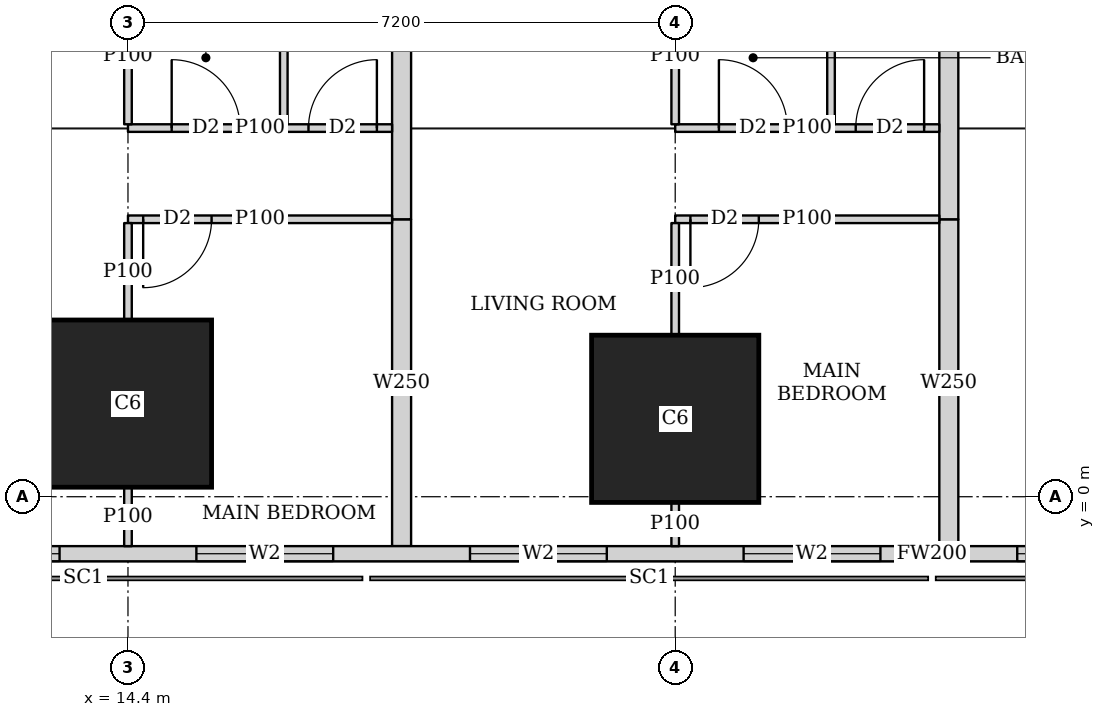
"""IFC4 building model, lengths in metres.
Left out: names, types, materials, properties, quantities, classifications, styles, units other than length and angle.
Written with IfcOpenShell. Run it as: python <this file> out.ifc"""

import sys

from ifc_helpers import new_model, si_unit, direction, frame, frame_2d, origin, origin_2d, place, context, subcontext, project, spatial, rectangle, extrude, element, fill, save


model = new_model("IFC4")
c1 = context("Model", 3, precision=1e-05, world=origin(), true_north=direction((0.0, 1.0)))
c2 = subcontext(c1, "Body", "Model", "MODEL_VIEW")
j1 = project(units=[si_unit("LENGTHUNIT", "METRE"), si_unit("PLANEANGLEUNIT", "RADIAN")], contexts=[c1])
p1 = place(None, origin())
s1 = spatial("IfcSite", under=j1, at=p1, CompositionType="ELEMENT")
p2 = place(p1, origin())
s2 = spatial("IfcBuilding", under=s1, at=p2, CompositionType="ELEMENT")
p3 = place(p2, frame((0.0, 0.0, 89.15)))
s3 = spatial("IfcBuildingStorey", under=s2, at=p3, CompositionType="ELEMENT", Elevation=89.15)
for number, where, z_axis, x_axis in (
    (1, (14.4, 1.225, 0.0), (0.0, 0.0, 1.0), (1.0, 0.0, 0.0)),
    (2, (21.6, 1.025, 0.0), (0.0, 0.0, 1.0), (1.0, 0.0, 0.0)),
):
    element("IfcColumn", number, at=place(p3, frame(where, z_axis=z_axis, x_axis=x_axis)), inside=s3, PredefinedType="COLUMN", context=c2, shape_type="SweptSolid", body=[
        extrude(rectangle(XDim=2.2, YDim=2.2, at=origin_2d()), origin(), (0.0, 0.0, 1.0), 3.75),
    ])
p4 = place(p3, frame((2.163, -0.75, 0.0), z_axis=(0.0, 0.0, 1.0), x_axis=(1.0, 0.0, 0.0)))
e3 = element("IfcWall", 3, at=p4, inside=s3, PredefinedType="SOLIDWALL", context=c2, shape_type="SweptSolid", body=[
    extrude(rectangle(XDim=45.628, YDim=0.2, at=frame_2d((22.814, 0.0))), origin(), (0.0, 0.0, 1.0), 3.5),
])
p5 = place(p4, frame((9.537, 0.0, 0.9)))
e4 = element("IfcOpeningElement", 4, at=p5, cuts=e3, PredefinedType="OPENING", context=c2, shape_type="SweptSolid", body=[
    extrude(rectangle(XDim=1.8, YDim=1.5, at=frame_2d((0.9, 0.75))), frame((0.0, 0.11, 0.0), z_axis=(0.0, -1.0, 0.0), x_axis=(1.0, 0.0, 0.0)), (0.0, 0.0, 1.0), 0.22),
])
p6 = place(p4, frame((13.137, 0.0, 0.9)))
e5 = element("IfcOpeningElement", 5, at=p6, cuts=e3, PredefinedType="OPENING", context=c2, shape_type="SweptSolid", body=[
    extrude(rectangle(XDim=1.8, YDim=1.5, at=frame_2d((0.9, 0.75))), frame((0.0, 0.11, 0.0), z_axis=(0.0, -1.0, 0.0), x_axis=(1.0, 0.0, 0.0)), (0.0, 0.0, 1.0), 0.22),
])
p7 = place(p4, frame((16.737, 0.0, 0.9)))
e6 = element("IfcOpeningElement", 6, at=p7, cuts=e3, PredefinedType="OPENING", context=c2, shape_type="SweptSolid", body=[
    extrude(rectangle(XDim=1.8, YDim=1.5, at=frame_2d((0.9, 0.75))), frame((0.0, 0.11, 0.0), z_axis=(0.0, -1.0, 0.0), x_axis=(1.0, 0.0, 0.0)), (0.0, 0.0, 1.0), 0.22),
])
p8 = place(p4, frame((20.337, 0.0, 0.9)))
e7 = element("IfcOpeningElement", 7, at=p8, cuts=e3, PredefinedType="OPENING", context=c2, shape_type="SweptSolid", body=[
    extrude(rectangle(XDim=1.8, YDim=1.5, at=frame_2d((0.9, 0.75))), frame((0.0, 0.11, 0.0), z_axis=(0.0, -1.0, 0.0), x_axis=(1.0, 0.0, 0.0)), (0.0, 0.0, 1.0), 0.22),
])
p9 = place(p4, frame((23.937, 0.0, 0.9)))
e8 = element("IfcOpeningElement", 8, at=p9, cuts=e3, PredefinedType="OPENING", context=c2, shape_type="SweptSolid", body=[
    extrude(rectangle(XDim=1.8, YDim=1.5, at=frame_2d((0.9, 0.75))), frame((0.0, 0.11, 0.0), z_axis=(0.0, -1.0, 0.0), x_axis=(1.0, 0.0, 0.0)), (0.0, 0.0, 1.0), 0.22),
])
p10 = place(p4, frame((27.537, 0.0, 0.9)))
e9 = element("IfcOpeningElement", 9, at=p10, cuts=e3, PredefinedType="OPENING", context=c2, shape_type="SweptSolid", body=[
    extrude(rectangle(XDim=1.8, YDim=1.5, at=frame_2d((0.9, 0.75))), frame((0.0, 0.11, 0.0), z_axis=(0.0, -1.0, 0.0), x_axis=(1.0, 0.0, 0.0)), (0.0, 0.0, 1.0), 0.22),
])
p11 = place(p4, frame((31.137, 0.0, 0.9)))
e10 = element("IfcOpeningElement", 10, at=p11, cuts=e3, PredefinedType="OPENING", context=c2, shape_type="SweptSolid", body=[
    extrude(rectangle(XDim=1.8, YDim=1.5, at=frame_2d((0.9, 0.75))), frame((0.0, 0.11, 0.0), z_axis=(0.0, -1.0, 0.0), x_axis=(1.0, 0.0, 0.0)), (0.0, 0.0, 1.0), 0.22),
])
p12 = place(p4, frame((34.737, 0.0, 0.9)))
e11 = element("IfcOpeningElement", 11, at=p12, cuts=e3, PredefinedType="OPENING", context=c2, shape_type="SweptSolid", body=[
    extrude(rectangle(XDim=1.8, YDim=1.5, at=frame_2d((0.9, 0.75))), frame((0.0, 0.11, 0.0), z_axis=(0.0, -1.0, 0.0), x_axis=(1.0, 0.0, 0.0)), (0.0, 0.0, 1.0), 0.22),
])
p13 = place(p3, frame((17.875, 3.65, 0.0), z_axis=(0.0, 0.0, 1.0), x_axis=(-1.0, 0.0, 0.0)))
e12 = element("IfcWall", 12, at=p13, inside=s3, PredefinedType="PARTITIONING", context=c2, shape_type="SweptSolid", body=[
    extrude(rectangle(XDim=3.475, YDim=0.1, at=frame_2d((1.738, 0.0))), origin(), (0.0, 0.0, 1.0), 3.5),
])
p14 = place(p13, frame((2.375, 0.0, 0.0)))
e13 = element("IfcOpeningElement", 13, at=p14, cuts=e12, PredefinedType="OPENING", context=c2, shape_type="SweptSolid", body=[
    extrude(rectangle(XDim=0.9, YDim=2.1, at=frame_2d((0.45, 1.05))), frame((0.0, 0.06, 0.0), z_axis=(0.0, -1.0, 0.0), x_axis=(1.0, 0.0, 0.0)), (0.0, 0.0, 1.0), 0.12),
])
p15 = place(p3, frame((17.875, 4.85, 0.0), z_axis=(0.0, 0.0, 1.0), x_axis=(-1.0, 0.0, 0.0)))
e14 = element("IfcWall", 14, at=p15, inside=s3, PredefinedType="PARTITIONING", context=c2, shape_type="SweptSolid", body=[
    extrude(rectangle(XDim=3.475, YDim=0.1, at=frame_2d((1.738, 0.0))), origin(), (0.0, 0.0, 1.0), 3.5),
])
p16 = place(p15, frame((2.0, 0.0, 0.0)))
e15 = element("IfcOpeningElement", 15, at=p16, cuts=e14, PredefinedType="OPENING", context=c2, shape_type="SweptSolid", body=[
    extrude(rectangle(XDim=0.9, YDim=2.1, at=frame_2d((0.45, 1.05))), frame((0.0, 0.06, 0.0), z_axis=(0.0, -1.0, 0.0), x_axis=(1.0, 0.0, 0.0)), (0.0, 0.0, 1.0), 0.12),
])
p17 = place(p15, frame((0.2, 0.0, 0.0)))
e16 = element("IfcOpeningElement", 16, at=p17, cuts=e14, PredefinedType="OPENING", context=c2, shape_type="SweptSolid", body=[
    extrude(rectangle(XDim=0.9, YDim=2.1, at=frame_2d((0.45, 1.05))), frame((0.0, 0.06, 0.0), z_axis=(0.0, -1.0, 0.0), x_axis=(1.0, 0.0, 0.0)), (0.0, 0.0, 1.0), 0.12),
])
p18 = place(p3, frame((14.4, -0.65, 0.0), z_axis=(0.0, 0.0, 1.0), x_axis=(0.0, 1.0, 0.0)))
e17 = element("IfcWall", 17, at=p18, inside=s3, PredefinedType="PARTITIONING", context=c2, shape_type="SweptSolid", body=[
    extrude(rectangle(XDim=0.774, YDim=0.1, at=frame_2d((0.387, 0.0))), origin(), (0.0, 0.0, 1.0), 3.5),
])
p19 = place(p3, frame((14.4, 2.326, 0.0), z_axis=(0.0, 0.0, 1.0), x_axis=(0.0, 1.0, 0.0)))
e18 = element("IfcWall", 18, at=p19, inside=s3, PredefinedType="PARTITIONING", context=c2, shape_type="SweptSolid", body=[
    extrude(rectangle(XDim=1.274, YDim=0.1, at=frame_2d((0.637, 0.0))), origin(), (0.0, 0.0, 1.0), 3.5),
])
p20 = place(p3, frame((14.4, 4.9, 0.0), z_axis=(0.0, 0.0, 1.0), x_axis=(0.0, 1.0, 0.0)))
e19 = element("IfcWall", 19, at=p20, inside=s3, PredefinedType="PARTITIONING", context=c2, shape_type="SweptSolid", body=[
    extrude(rectangle(XDim=1.799, YDim=0.1, at=frame_2d((0.899, 0.0))), origin(), (0.0, 0.0, 1.0), 3.5),
])
p21 = place(p3, frame((16.45, 4.9, 0.0), z_axis=(0.0, 0.0, 1.0), x_axis=(0.0, 1.0, 0.0)))
e20 = element("IfcWall", 20, at=p21, inside=s3, PredefinedType="PARTITIONING", context=c2, shape_type="SweptSolid", body=[
    extrude(rectangle(XDim=3.525, YDim=0.1, at=frame_2d((1.763, 0.0))), origin(), (0.0, 0.0, 1.0), 3.5),
])
p22 = place(p3, frame((25.075, 3.65, 0.0), z_axis=(0.0, 0.0, 1.0), x_axis=(-1.0, 0.0, 0.0)))
e21 = element("IfcWall", 21, at=p22, inside=s3, PredefinedType="PARTITIONING", context=c2, shape_type="SweptSolid", body=[
    extrude(rectangle(XDim=3.475, YDim=0.1, at=frame_2d((1.737, 0.0))), origin(), (0.0, 0.0, 1.0), 3.5),
])
p23 = place(p22, frame((2.375, 0.0, 0.0)))
e22 = element("IfcOpeningElement", 22, at=p23, cuts=e21, PredefinedType="OPENING", context=c2, shape_type="SweptSolid", body=[
    extrude(rectangle(XDim=0.9, YDim=2.1, at=frame_2d((0.45, 1.05))), frame((0.0, 0.06, 0.0), z_axis=(0.0, -1.0, 0.0), x_axis=(1.0, 0.0, 0.0)), (0.0, 0.0, 1.0), 0.12),
])
p24 = place(p3, frame((25.075, 4.85, 0.0), z_axis=(0.0, 0.0, 1.0), x_axis=(-1.0, 0.0, 0.0)))
e23 = element("IfcWall", 23, at=p24, inside=s3, PredefinedType="PARTITIONING", context=c2, shape_type="SweptSolid", body=[
    extrude(rectangle(XDim=3.475, YDim=0.1, at=frame_2d((1.737, 0.0))), origin(), (0.0, 0.0, 1.0), 3.5),
])
p25 = place(p24, frame((2.0, 0.0, 0.0)))
e24 = element("IfcOpeningElement", 24, at=p25, cuts=e23, PredefinedType="OPENING", context=c2, shape_type="SweptSolid", body=[
    extrude(rectangle(XDim=0.9, YDim=2.1, at=frame_2d((0.45, 1.05))), frame((0.0, 0.06, 0.0), z_axis=(0.0, -1.0, 0.0), x_axis=(1.0, 0.0, 0.0)), (0.0, 0.0, 1.0), 0.12),
])
p26 = place(p24, frame((0.2, 0.0, 0.0)))
e25 = element("IfcOpeningElement", 25, at=p26, cuts=e23, PredefinedType="OPENING", context=c2, shape_type="SweptSolid", body=[
    extrude(rectangle(XDim=0.9, YDim=2.1, at=frame_2d((0.45, 1.05))), frame((0.0, 0.06, 0.0), z_axis=(0.0, -1.0, 0.0), x_axis=(1.0, 0.0, 0.0)), (0.0, 0.0, 1.0), 0.12),
])
p27 = place(p3, frame((21.6, -0.65, 0.0), z_axis=(0.0, 0.0, 1.0), x_axis=(0.0, 1.0, 0.0)))
e26 = element("IfcWall", 26, at=p27, inside=s3, PredefinedType="PARTITIONING", context=c2, shape_type="SweptSolid", body=[
    extrude(rectangle(XDim=0.574, YDim=0.1, at=frame_2d((0.287, 0.0))), origin(), (0.0, 0.0, 1.0), 3.5),
])
p28 = place(p3, frame((21.6, 2.126, 0.0), z_axis=(0.0, 0.0, 1.0), x_axis=(0.0, 1.0, 0.0)))
e27 = element("IfcWall", 27, at=p28, inside=s3, PredefinedType="PARTITIONING", context=c2, shape_type="SweptSolid", body=[
    extrude(rectangle(XDim=1.474, YDim=0.1, at=frame_2d((0.737, 0.0))), origin(), (0.0, 0.0, 1.0), 3.5),
])
p29 = place(p3, frame((21.6, 4.9, 0.0), z_axis=(0.0, 0.0, 1.0), x_axis=(0.0, 1.0, 0.0)))
e28 = element("IfcWall", 28, at=p29, inside=s3, PredefinedType="PARTITIONING", context=c2, shape_type="SweptSolid", body=[
    extrude(rectangle(XDim=1.799, YDim=0.1, at=frame_2d((0.899, 0.0))), origin(), (0.0, 0.0, 1.0), 3.5),
])
p30 = place(p3, frame((23.65, 4.9, 0.0), z_axis=(0.0, 0.0, 1.0), x_axis=(0.0, 1.0, 0.0)))
e29 = element("IfcWall", 29, at=p30, inside=s3, PredefinedType="PARTITIONING", context=c2, shape_type="SweptSolid", body=[
    extrude(rectangle(XDim=3.525, YDim=0.1, at=frame_2d((1.763, 0.0))), origin(), (0.0, 0.0, 1.0), 3.5),
])
p31 = place(p3, frame((18.0, -0.65, 0.0), z_axis=(0.0, 0.0, 1.0), x_axis=(0.0, 1.0, 0.0)))
e30 = element("IfcWall", 30, at=p31, inside=s3, PredefinedType="SOLIDWALL", context=c2, shape_type="SweptSolid", body=[
    extrude(rectangle(XDim=4.3, YDim=0.25, at=frame_2d((2.15, 0.0))), origin(), (0.0, 0.0, 1.0), 2.2),
])
p32 = place(p3, frame((18.0, 3.65, 0.0), z_axis=(0.0, 0.0, 1.0), x_axis=(0.0, 1.0, 0.0)))
e31 = element("IfcWall", 31, at=p32, inside=s3, PredefinedType="SOLIDWALL", context=c2, shape_type="SweptSolid", body=[
    extrude(rectangle(XDim=4.775, YDim=0.25, at=frame_2d((2.388, 0.0))), origin(), (0.0, 0.0, 1.0), 3.5),
])
p33 = place(p3, frame((25.2, -0.65, 0.0), z_axis=(0.0, 0.0, 1.0), x_axis=(0.0, 1.0, 0.0)))
e32 = element("IfcWall", 32, at=p33, inside=s3, PredefinedType="SOLIDWALL", context=c2, shape_type="SweptSolid", body=[
    extrude(rectangle(XDim=4.3, YDim=0.25, at=frame_2d((2.15, 0.0))), origin(), (0.0, 0.0, 1.0), 2.2),
])
p34 = place(p3, frame((25.2, 3.65, 0.0), z_axis=(0.0, 0.0, 1.0), x_axis=(0.0, 1.0, 0.0)))
e33 = element("IfcWall", 33, at=p34, inside=s3, PredefinedType="SOLIDWALL", context=c2, shape_type="SweptSolid", body=[
    extrude(rectangle(XDim=4.775, YDim=0.25, at=frame_2d((2.388, 0.0))), origin(), (0.0, 0.0, 1.0), 3.5),
])
p35 = place(p5, origin())
e34 = element("IfcWindow", 34, at=p35, inside=s3, PartitioningType="SINGLE_PANEL", PredefinedType="WINDOW", context=c2, shape_type="SweptSolid", body=[
    extrude(rectangle(XDim=1.8, YDim=1.5, at=frame_2d((0.9, 0.75))), frame((0.0, 0.03, 0.0), z_axis=(0.0, -1.0, 0.0), x_axis=(1.0, 0.0, 0.0)), (0.0, 0.0, 1.0), 0.06),
])
fill(e4, e34)
p36 = place(p6, origin())
e35 = element("IfcWindow", 35, at=p36, inside=s3, PartitioningType="SINGLE_PANEL", PredefinedType="WINDOW", context=c2, shape_type="SweptSolid", body=[
    extrude(rectangle(XDim=1.8, YDim=1.5, at=frame_2d((0.9, 0.75))), frame((0.0, 0.03, 0.0), z_axis=(0.0, -1.0, 0.0), x_axis=(1.0, 0.0, 0.0)), (0.0, 0.0, 1.0), 0.06),
])
fill(e5, e35)
p37 = place(p7, origin())
e36 = element("IfcWindow", 36, at=p37, inside=s3, PartitioningType="SINGLE_PANEL", PredefinedType="WINDOW", context=c2, shape_type="SweptSolid", body=[
    extrude(rectangle(XDim=1.8, YDim=1.5, at=frame_2d((0.9, 0.75))), frame((0.0, 0.03, 0.0), z_axis=(0.0, -1.0, 0.0), x_axis=(1.0, 0.0, 0.0)), (0.0, 0.0, 1.0), 0.06),
])
fill(e6, e36)
p38 = place(p8, origin())
e37 = element("IfcWindow", 37, at=p38, inside=s3, PartitioningType="SINGLE_PANEL", PredefinedType="WINDOW", context=c2, shape_type="SweptSolid", body=[
    extrude(rectangle(XDim=1.8, YDim=1.5, at=frame_2d((0.9, 0.75))), frame((0.0, 0.03, 0.0), z_axis=(0.0, -1.0, 0.0), x_axis=(1.0, 0.0, 0.0)), (0.0, 0.0, 1.0), 0.06),
])
fill(e7, e37)
p39 = place(p9, origin())
e38 = element("IfcWindow", 38, at=p39, inside=s3, PartitioningType="SINGLE_PANEL", PredefinedType="WINDOW", context=c2, shape_type="SweptSolid", body=[
    extrude(rectangle(XDim=1.8, YDim=1.5, at=frame_2d((0.9, 0.75))), frame((0.0, 0.03, 0.0), z_axis=(0.0, -1.0, 0.0), x_axis=(1.0, 0.0, 0.0)), (0.0, 0.0, 1.0), 0.06),
])
fill(e8, e38)
p40 = place(p14, origin())
e39 = element("IfcDoor", 39, at=p40, inside=s3, OperationType="SINGLE_SWING_RIGHT", PredefinedType="DOOR", context=c2, shape_type="SweptSolid", body=[
    extrude(rectangle(XDim=0.9, YDim=2.1, at=frame_2d((0.45, 1.05))), frame((0.0, 0.025, 0.0), z_axis=(0.0, -1.0, 0.0), x_axis=(1.0, 0.0, 0.0)), (0.0, 0.0, 1.0), 0.05),
])
fill(e13, e39)
p41 = place(p16, origin())
e40 = element("IfcDoor", 40, at=p41, inside=s3, OperationType="SINGLE_SWING_LEFT", PredefinedType="DOOR", context=c2, shape_type="SweptSolid", body=[
    extrude(rectangle(XDim=0.9, YDim=2.1, at=frame_2d((0.45, 1.05))), frame((0.0, 0.025, 0.0), z_axis=(0.0, -1.0, 0.0), x_axis=(1.0, 0.0, 0.0)), (0.0, 0.0, 1.0), 0.05),
])
fill(e15, e40)
p42 = place(p17, origin())
e41 = element("IfcDoor", 41, at=p42, inside=s3, OperationType="SINGLE_SWING_RIGHT", PredefinedType="DOOR", context=c2, shape_type="SweptSolid", body=[
    extrude(rectangle(XDim=0.9, YDim=2.1, at=frame_2d((0.45, 1.05))), frame((0.0, 0.025, 0.0), z_axis=(0.0, -1.0, 0.0), x_axis=(1.0, 0.0, 0.0)), (0.0, 0.0, 1.0), 0.05),
])
fill(e16, e41)
p43 = place(p23, origin())
e42 = element("IfcDoor", 42, at=p43, inside=s3, OperationType="SINGLE_SWING_RIGHT", PredefinedType="DOOR", context=c2, shape_type="SweptSolid", body=[
    extrude(rectangle(XDim=0.9, YDim=2.1, at=frame_2d((0.45, 1.05))), frame((0.0, 0.025, 0.0), z_axis=(0.0, -1.0, 0.0), x_axis=(1.0, 0.0, 0.0)), (0.0, 0.0, 1.0), 0.05),
])
fill(e22, e42)
p44 = place(p25, origin())
e43 = element("IfcDoor", 43, at=p44, inside=s3, OperationType="SINGLE_SWING_LEFT", PredefinedType="DOOR", context=c2, shape_type="SweptSolid", body=[
    extrude(rectangle(XDim=0.9, YDim=2.1, at=frame_2d((0.45, 1.05))), frame((0.0, 0.025, 0.0), z_axis=(0.0, -1.0, 0.0), x_axis=(1.0, 0.0, 0.0)), (0.0, 0.0, 1.0), 0.05),
])
fill(e24, e43)
p45 = place(p26, origin())
e44 = element("IfcDoor", 44, at=p45, inside=s3, OperationType="SINGLE_SWING_RIGHT", PredefinedType="DOOR", context=c2, shape_type="SweptSolid", body=[
    extrude(rectangle(XDim=0.9, YDim=2.1, at=frame_2d((0.45, 1.05))), frame((0.0, 0.025, 0.0), z_axis=(0.0, -1.0, 0.0), x_axis=(1.0, 0.0, 0.0)), (0.0, 0.0, 1.0), 0.05),
])
fill(e25, e44)
save(model, sys.argv[1])
